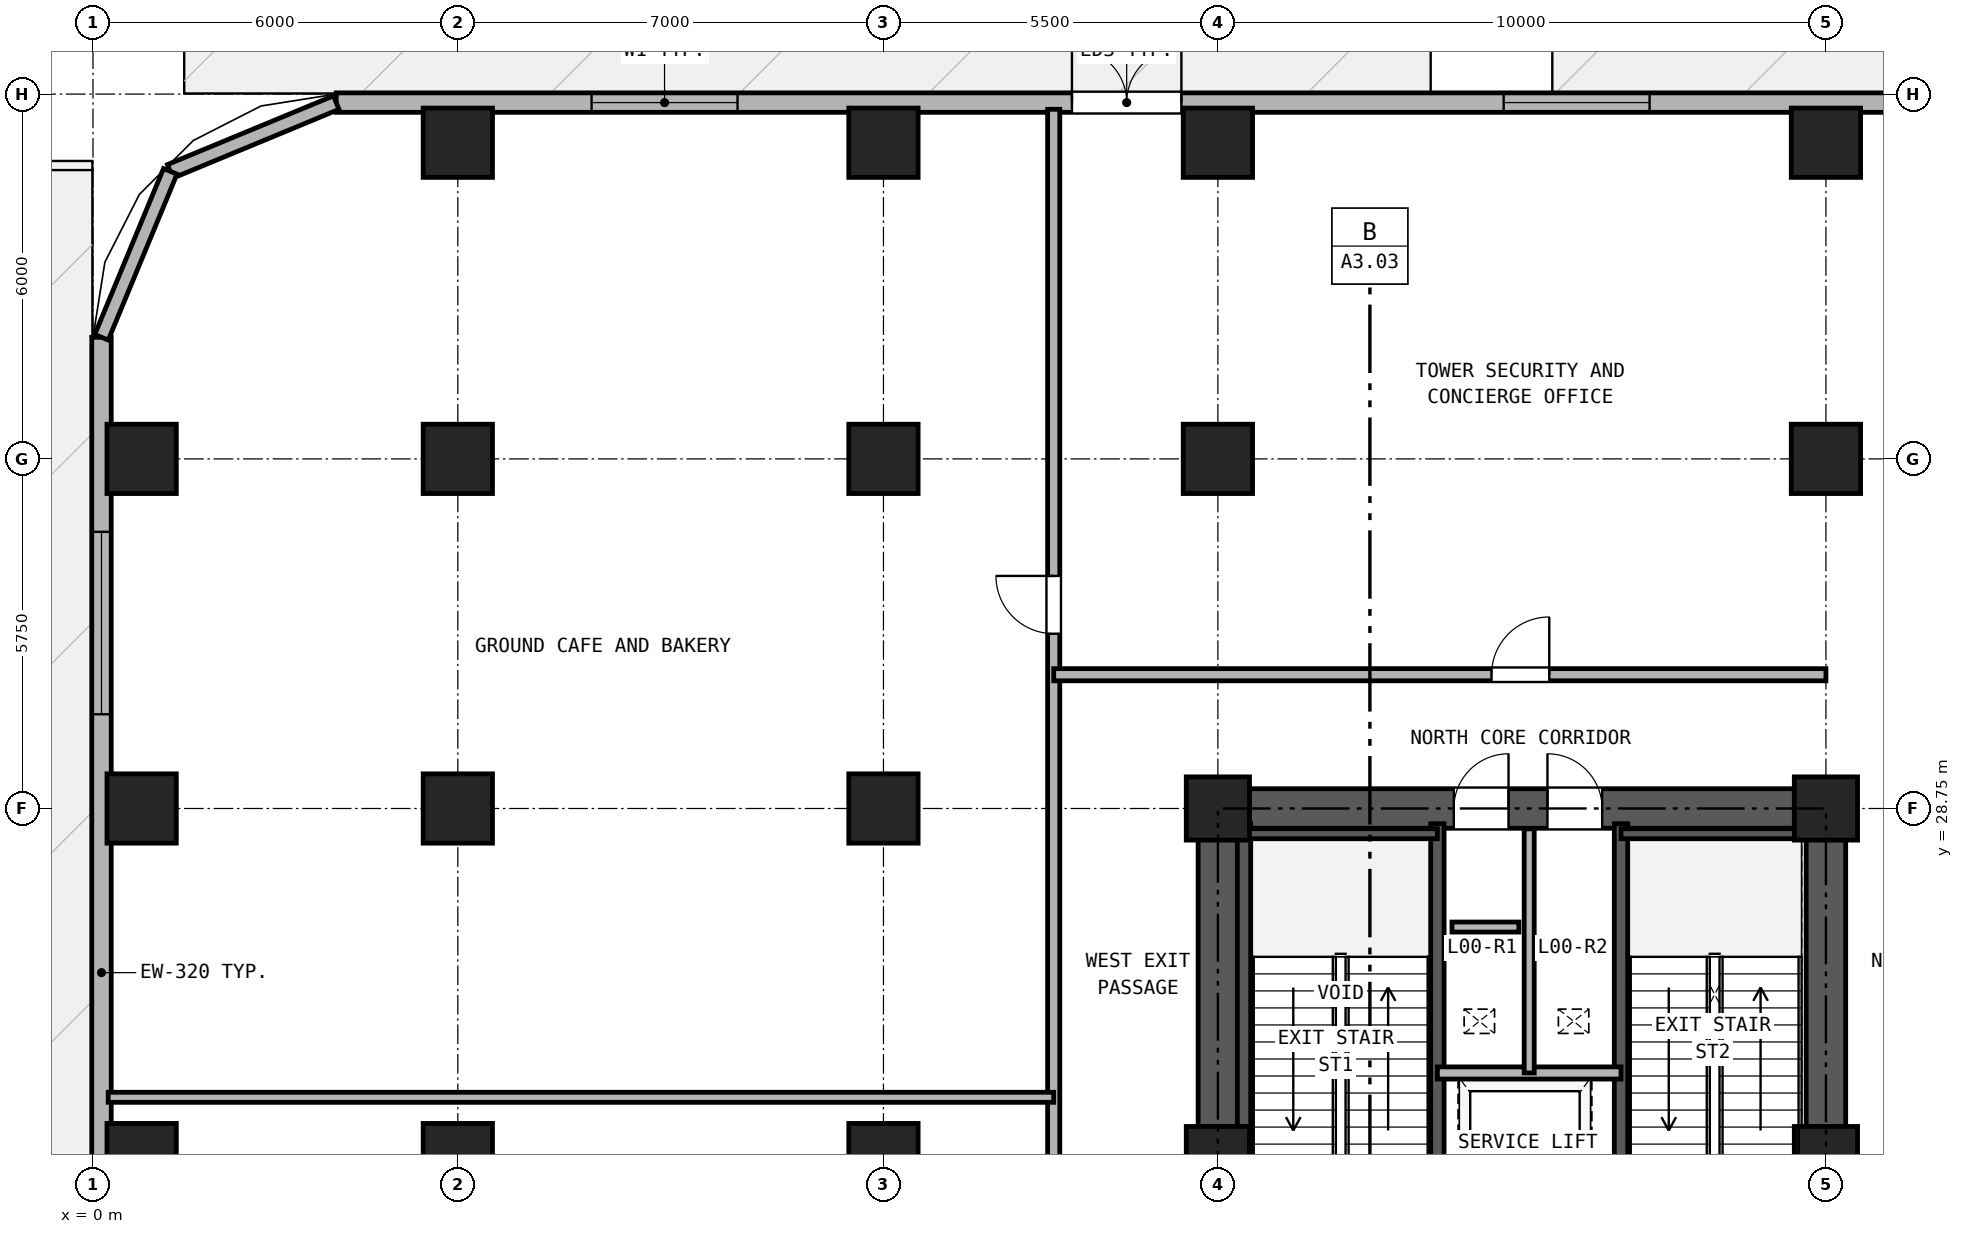
"""IFC4 building model, lengths in metres.
Left out: names, types, materials, properties, quantities, classifications, styles, units other than length and angle.
Written with IfcOpenShell. Run it as: python <this file> out.ifc"""

import sys

from ifc_helpers import new_model, si_unit, direction, frame, frame_2d, origin, origin_2d, place, context, subcontext, project, spatial, rectangle, hollow_rectangle, extrude, source, transform, mapped, element, fill, save


model = new_model("IFC4")
c1 = context("Model", 3, precision=1e-05, world=origin(), true_north=direction((0.0, 1.0)))
c2 = subcontext(c1, "Body", "Model", "MODEL_VIEW")
j1 = project(units=[si_unit("LENGTHUNIT", "METRE"), si_unit("PLANEANGLEUNIT", "RADIAN")], contexts=[c1])
p1 = place(None, origin())
s1 = spatial("IfcSite", under=j1, at=p1, CompositionType="ELEMENT")
p2 = place(p1, origin())
s2 = spatial("IfcBuilding", under=s1, at=p2, CompositionType="ELEMENT")
p3 = place(p2, origin())
s3 = spatial("IfcBuildingStorey", under=s2, at=p3, CompositionType="ELEMENT", Elevation=0.0)
m1 = source(origin(), c2, "Body", "SweptSolid", [
    extrude(hollow_rectangle(XDim=1.14, YDim=1.14, WallThickness=0.07, at=origin_2d()), origin(), (0.0, 0.0, 1.0), 4.18),
])
for number, where, z_axis, x_axis in (
    (1, (6.0, 39.7, 0.0), (0.0, 0.0, 1.0), (1.0, 0.0, 0.0)),
    (2, (13.0, 39.7, 0.0), (0.0, 0.0, 1.0), (1.0, 0.0, 0.0)),
    (3, (18.5, 39.7, 0.0), (0.0, 0.0, 1.0), (1.0, 0.0, 0.0)),
    (4, (28.5, 39.7, 0.0), (0.0, 0.0, 1.0), (1.0, 0.0, 0.0)),
    (5, (0.8, 23.0, 0.0), (0.0, 0.0, 1.0), (1.0, 0.0, 0.0)),
    (6, (0.8, 28.75, 0.0), (0.0, 0.0, 1.0), (1.0, 0.0, 0.0)),
    (7, (0.8, 34.5, 0.0), (0.0, 0.0, 1.0), (1.0, 0.0, 0.0)),
    (8, (6.0, 23.0, 0.0), (0.0, 0.0, 1.0), (1.0, 0.0, 0.0)),
    (9, (6.0, 28.75, 0.0), (0.0, 0.0, 1.0), (1.0, 0.0, 0.0)),
    (10, (6.0, 34.5, 0.0), (0.0, 0.0, 1.0), (1.0, 0.0, 0.0)),
    (11, (13.0, 23.0, 0.0), (0.0, 0.0, 1.0), (1.0, 0.0, 0.0)),
    (12, (13.0, 28.75, 0.0), (0.0, 0.0, 1.0), (1.0, 0.0, 0.0)),
    (13, (13.0, 34.5, 0.0), (0.0, 0.0, 1.0), (1.0, 0.0, 0.0)),
):
    element("IfcColumn", number, at=place(p3, frame(where, z_axis=z_axis, x_axis=x_axis)), inside=s3, PredefinedType="COLUMN", context=c2, shape_type="MappedRepresentation", body=[
        mapped(m1, transform((0.0, 0.0, 0.0), x_axis=(1.0, 0.0, 0.0), y_axis=(0.0, 1.0, 0.0), z_axis=(0.0, 0.0, 1.0), scale=1.0)),
    ])
m2 = source(origin(), c2, "Body", "SweptSolid", [
    extrude(hollow_rectangle(XDim=1.04, YDim=1.04, WallThickness=0.065, at=origin_2d()), origin(), (0.0, 0.0, 1.0), 4.18),
])
for number, where, z_axis, x_axis in (
    (14, (18.5, 23.0, 0.0), (0.0, 0.0, 1.0), (1.0, 0.0, 0.0)),
    (15, (18.5, 28.75, 0.0), (0.0, 0.0, 1.0), (1.0, 0.0, 0.0)),
):
    element("IfcColumn", number, at=place(p3, frame(where, z_axis=z_axis, x_axis=x_axis)), inside=s3, PredefinedType="COLUMN", context=c2, shape_type="MappedRepresentation", body=[
        mapped(m2, transform((0.0, 0.0, 0.0), x_axis=(1.0, 0.0, 0.0), y_axis=(0.0, 1.0, 0.0), z_axis=(0.0, 0.0, 1.0), scale=1.0)),
    ])
p4 = place(p3, frame((18.5, 34.5, 0.0), z_axis=(0.0, 0.0, 1.0), x_axis=(1.0, 0.0, 0.0)))
e16 = element("IfcColumn", 16, at=p4, inside=s3, PredefinedType="COLUMN", context=c2, shape_type="MappedRepresentation", body=[
    mapped(m1, transform((0.0, 0.0, 0.0), x_axis=(1.0, 0.0, 0.0), y_axis=(0.0, 1.0, 0.0), z_axis=(0.0, 0.0, 1.0), scale=1.0)),
])
for number, where, z_axis, x_axis in (
    (17, (28.5, 23.0, 0.0), (0.0, 0.0, 1.0), (1.0, 0.0, 0.0)),
    (18, (28.5, 28.75, 0.0), (0.0, 0.0, 1.0), (1.0, 0.0, 0.0)),
):
    element("IfcColumn", number, at=place(p3, frame(where, z_axis=z_axis, x_axis=x_axis)), inside=s3, PredefinedType="COLUMN", context=c2, shape_type="MappedRepresentation", body=[
        mapped(m2, transform((0.0, 0.0, 0.0), x_axis=(1.0, 0.0, 0.0), y_axis=(0.0, 1.0, 0.0), z_axis=(0.0, 0.0, 1.0), scale=1.0)),
    ])
p5 = place(p3, frame((28.5, 34.5, 0.0), z_axis=(0.0, 0.0, 1.0), x_axis=(1.0, 0.0, 0.0)))
e19 = element("IfcColumn", 19, at=p5, inside=s3, PredefinedType="COLUMN", context=c2, shape_type="MappedRepresentation", body=[
    mapped(m1, transform((0.0, 0.0, 0.0), x_axis=(1.0, 0.0, 0.0), y_axis=(0.0, 1.0, 0.0), z_axis=(0.0, 0.0, 1.0), scale=1.0)),
])
p6 = place(p3, frame((0.14, 4.0, 0.0), z_axis=(0.0, 0.0, 1.0), x_axis=(0.0, 1.0, 0.0)))
e20 = element("IfcWall", 20, at=p6, inside=s3, PredefinedType="SOLIDWALL", context=c2, shape_type="SweptSolid", body=[
    extrude(rectangle(XDim=32.5, YDim=0.32, at=frame_2d((16.25, 0.0))), origin(), (0.0, 0.0, 1.0), 4.18),
])
p7 = place(p6, frame((9.8, 0.0, 0.0)))
e21 = element("IfcOpeningElement", 21, at=p7, cuts=e20, PredefinedType="OPENING", context=c2, shape_type="SweptSolid", body=[
    extrude(rectangle(XDim=2.2, YDim=2.5, at=frame_2d((1.1, 1.25))), frame((0.0, 0.17, 0.0), z_axis=(0.0, -1.0, 0.0), x_axis=(1.0, 0.0, 0.0)), (0.0, 0.0, 1.0), 0.34),
])
p8 = place(p6, frame((3.4, 0.0, 0.9)))
e22 = element("IfcOpeningElement", 22, at=p8, cuts=e20, PredefinedType="OPENING", context=c2, shape_type="SweptSolid", body=[
    extrude(rectangle(XDim=3.0, YDim=2.25, at=frame_2d((1.5, 1.125))), frame((0.0, 0.17, 0.0), z_axis=(0.0, -1.0, 0.0), x_axis=(1.0, 0.0, 0.0)), (0.0, 0.0, 1.0), 0.34),
])
p9 = place(p6, frame((14.8, 0.0, 0.9)))
e23 = element("IfcOpeningElement", 23, at=p9, cuts=e20, PredefinedType="OPENING", context=c2, shape_type="SweptSolid", body=[
    extrude(rectangle(XDim=3.0, YDim=2.25, at=frame_2d((1.5, 1.125))), frame((0.0, 0.17, 0.0), z_axis=(0.0, -1.0, 0.0), x_axis=(1.0, 0.0, 0.0)), (0.0, 0.0, 1.0), 0.34),
])
p10 = place(p6, frame((26.3, 0.0, 0.9)))
e24 = element("IfcOpeningElement", 24, at=p10, cuts=e20, PredefinedType="OPENING", context=c2, shape_type="SweptSolid", body=[
    extrude(rectangle(XDim=3.0, YDim=2.25, at=frame_2d((1.5, 1.125))), frame((0.0, 0.17, 0.0), z_axis=(0.0, -1.0, 0.0), x_axis=(1.0, 0.0, 0.0)), (0.0, 0.0, 1.0), 0.34),
])
p11 = place(p3, frame((4.0, 40.36, 0.0), z_axis=(0.0, 0.0, 1.0), x_axis=(1.0, 0.0, 0.0)))
e25 = element("IfcWall", 25, at=p11, inside=s3, PredefinedType="SOLIDWALL", context=c2, shape_type="SweptSolid", body=[
    extrude(rectangle(XDim=39.0, YDim=0.32, at=frame_2d((19.5, 0.0))), origin(), (0.0, 0.0, 1.0), 4.18),
])
p12 = place(p11, frame((12.1, 0.0, 0.0)))
e26 = element("IfcOpeningElement", 26, at=p12, cuts=e25, PredefinedType="OPENING", context=c2, shape_type="SweptSolid", body=[
    extrude(rectangle(XDim=1.8, YDim=2.35, at=frame_2d((0.9, 1.175))), frame((0.0, 0.17, 0.0), z_axis=(0.0, -1.0, 0.0), x_axis=(1.0, 0.0, 0.0)), (0.0, 0.0, 1.0), 0.34),
])
p13 = place(p11, frame((25.95, 0.0, 0.0)))
e27 = element("IfcOpeningElement", 27, at=p13, cuts=e25, PredefinedType="OPENING", context=c2, shape_type="SweptSolid", body=[
    extrude(rectangle(XDim=1.8, YDim=2.35, at=frame_2d((0.9, 1.175))), frame((0.0, 0.17, 0.0), z_axis=(0.0, -1.0, 0.0), x_axis=(1.0, 0.0, 0.0)), (0.0, 0.0, 1.0), 0.34),
])
p14 = place(p11, frame((4.2, 0.0, 0.9)))
e28 = element("IfcOpeningElement", 28, at=p14, cuts=e25, PredefinedType="OPENING", context=c2, shape_type="SweptSolid", body=[
    extrude(rectangle(XDim=2.4, YDim=2.1, at=frame_2d((1.2, 1.05))), frame((0.0, 0.17, 0.0), z_axis=(0.0, -1.0, 0.0), x_axis=(1.0, 0.0, 0.0)), (0.0, 0.0, 1.0), 0.34),
])
p15 = place(p11, frame((19.2, 0.0, 0.9)))
e29 = element("IfcOpeningElement", 29, at=p15, cuts=e25, PredefinedType="OPENING", context=c2, shape_type="SweptSolid", body=[
    extrude(rectangle(XDim=2.4, YDim=2.1, at=frame_2d((1.2, 1.05))), frame((0.0, 0.17, 0.0), z_axis=(0.0, -1.0, 0.0), x_axis=(1.0, 0.0, 0.0)), (0.0, 0.0, 1.0), 0.34),
])
p16 = place(p11, frame((31.8, 0.0, 0.9)))
e30 = element("IfcOpeningElement", 30, at=p16, cuts=e25, PredefinedType="OPENING", context=c2, shape_type="SweptSolid", body=[
    extrude(rectangle(XDim=2.4, YDim=2.1, at=frame_2d((1.2, 1.05))), frame((0.0, 0.17, 0.0), z_axis=(0.0, -1.0, 0.0), x_axis=(1.0, 0.0, 0.0)), (0.0, 0.0, 1.0), 0.34),
])
for number, where, z_axis, x_axis in (
    (31, (4.0, 40.36, 0.0), (0.0, 0.0, 1.0), (-0.924, -0.383, 0.0)),
    (32, (1.271, 39.229, 0.0), (0.0, 0.0, 1.0), (-0.383, -0.924, 0.0)),
):
    element("IfcWall", number, at=place(p3, frame(where, z_axis=z_axis, x_axis=x_axis)), inside=s3, PredefinedType="SOLIDWALL", context=c2, shape_type="SweptSolid", body=[
        extrude(rectangle(XDim=2.954, YDim=0.24, at=frame_2d((1.477, 0.0))), origin(), (0.0, 0.0, 1.0), 4.18),
    ])
p17 = place(p3, frame((18.175, 28.75, 0.0), z_axis=(0.0, 0.0, 1.0), x_axis=(1.0, 0.0, 0.0)))
e33 = element("IfcWall", 33, at=p17, inside=s3, PredefinedType="SHEAR", context=c2, shape_type="SweptSolid", body=[
    extrude(rectangle(XDim=10.65, YDim=0.65, at=frame_2d((5.325, 0.0))), origin(), (0.0, 0.0, 1.0), 4.18),
])
p18 = place(p17, frame((4.205, 0.0, 0.0)))
e34 = element("IfcOpeningElement", 34, at=p18, cuts=e33, PredefinedType="OPENING", context=c2, shape_type="SweptSolid", body=[
    extrude(rectangle(XDim=0.9, YDim=2.05, at=frame_2d((0.45, 1.025))), frame((0.0, 0.335, 0.0), z_axis=(0.0, -1.0, 0.0), x_axis=(1.0, 0.0, 0.0)), (0.0, 0.0, 1.0), 0.67),
])
p19 = place(p17, frame((5.745, 0.0, 0.0)))
e35 = element("IfcOpeningElement", 35, at=p19, cuts=e33, PredefinedType="OPENING", context=c2, shape_type="SweptSolid", body=[
    extrude(rectangle(XDim=0.9, YDim=2.05, at=frame_2d((0.45, 1.025))), frame((0.0, 0.335, 0.0), z_axis=(0.0, -1.0, 0.0), x_axis=(1.0, 0.0, 0.0)), (0.0, 0.0, 1.0), 0.67),
])
p20 = place(p3, frame((18.5, 11.825, 0.0), z_axis=(0.0, 0.0, 1.0), x_axis=(0.0, 1.0, 0.0)))
e36 = element("IfcWall", 36, at=p20, inside=s3, PredefinedType="SHEAR", context=c2, shape_type="SweptSolid", body=[
    extrude(rectangle(XDim=16.6, YDim=0.65, at=frame_2d((8.3, 0.0))), origin(), (0.0, 0.0, 1.0), 4.18),
])
p21 = place(p20, frame((7.325, 0.0, 0.0)))
e37 = element("IfcOpeningElement", 37, at=p21, cuts=e36, PredefinedType="OPENING", context=c2, shape_type="SweptSolid", body=[
    extrude(rectangle(XDim=1.15, YDim=2.2, at=frame_2d((0.575, 1.1))), frame((0.0, 0.335, 0.0), z_axis=(0.0, -1.0, 0.0), x_axis=(1.0, 0.0, 0.0)), (0.0, 0.0, 1.0), 0.67),
])
p22 = place(p3, frame((28.5, 11.825, 0.0), z_axis=(0.0, 0.0, 1.0), x_axis=(0.0, 1.0, 0.0)))
e38 = element("IfcWall", 38, at=p22, inside=s3, PredefinedType="SHEAR", context=c2, shape_type="SweptSolid", body=[
    extrude(rectangle(XDim=16.6, YDim=0.65, at=frame_2d((8.3, 0.0))), origin(), (0.0, 0.0, 1.0), 4.18),
])
p23 = place(p22, frame((7.325, 0.0, 0.0)))
e39 = element("IfcOpeningElement", 39, at=p23, cuts=e38, PredefinedType="OPENING", context=c2, shape_type="SweptSolid", body=[
    extrude(rectangle(XDim=1.15, YDim=2.2, at=frame_2d((0.575, 1.1))), frame((0.0, 0.335, 0.0), z_axis=(0.0, -1.0, 0.0), x_axis=(1.0, 0.0, 0.0)), (0.0, 0.0, 1.0), 0.67),
])
for number, where, z_axis, x_axis in (
    (40, (18.93, 21.39, 0.0), (0.0, 0.0, 1.0), (0.0, 1.0, 0.0)),
    (41, (22.11, 21.39, 0.0), (0.0, 0.0, 1.0), (0.0, 1.0, 0.0)),
    (42, (25.13, 21.39, 0.0), (0.0, 0.0, 1.0), (0.0, 1.0, 0.0)),
):
    element("IfcWall", number, at=place(p3, frame(where, z_axis=z_axis, x_axis=x_axis)), inside=s3, PredefinedType="SOLIDWALL", context=c2, shape_type="SweptSolid", body=[
        extrude(rectangle(XDim=7.11, YDim=0.22, at=frame_2d((3.555, 0.0))), origin(), (0.0, 0.0, 1.0), 4.18),
    ])
p24 = place(p3, frame((18.835, 28.335, 0.0), z_axis=(0.0, 0.0, 1.0), x_axis=(1.0, 0.0, 0.0)))
e43 = element("IfcWall", 43, at=p24, inside=s3, PredefinedType="PARTITIONING", context=c2, shape_type="SweptSolid", body=[
    extrude(rectangle(XDim=3.275, YDim=0.165, at=frame_2d((1.638, 0.0))), origin(), (0.0, 0.0, 1.0), 4.18),
])
p25 = place(p3, frame((25.13, 28.335, 0.0), z_axis=(0.0, 0.0, 1.0), x_axis=(1.0, 0.0, 0.0)))
e44 = element("IfcWall", 44, at=p25, inside=s3, PredefinedType="PARTITIONING", context=c2, shape_type="SweptSolid", body=[
    extrude(rectangle(XDim=3.035, YDim=0.165, at=frame_2d((1.518, 0.0))), origin(), (0.0, 0.0, 1.0), 4.18),
])
p26 = place(p3, frame((22.11, 24.4, 0.0), z_axis=(0.0, 0.0, 1.0), x_axis=(1.0, 0.0, 0.0)))
e45 = element("IfcWall", 45, at=p26, inside=s3, PredefinedType="PARTITIONING", context=c2, shape_type="SweptSolid", body=[
    extrude(rectangle(XDim=3.02, YDim=0.2, at=frame_2d((1.51, 0.0))), origin(), (0.0, 0.0, 1.0), 4.18),
])
p27 = place(p3, frame((23.62, 24.4, 0.0), z_axis=(0.0, 0.0, 1.0), x_axis=(0.0, 1.0, 0.0)))
e46 = element("IfcWall", 46, at=p27, inside=s3, PredefinedType="PARTITIONING", context=c2, shape_type="SweptSolid", body=[
    extrude(rectangle(XDim=4.015, YDim=0.165, at=frame_2d((2.008, 0.0))), origin(), (0.0, 0.0, 1.0), 4.18),
])
p28 = place(p3, frame((15.8, 11.0, 0.0), z_axis=(0.0, 0.0, 1.0), x_axis=(0.0, 1.0, 0.0)))
e47 = element("IfcWall", 47, at=p28, inside=s3, PredefinedType="PARTITIONING", context=c2, shape_type="SweptSolid", body=[
    extrude(rectangle(XDim=29.25, YDim=0.2, at=frame_2d((14.625, 0.0))), origin(), (0.0, 0.0, 1.0), 4.18),
])
p29 = place(p28, frame((6.0, 0.0, 0.0)))
e48 = element("IfcOpeningElement", 48, at=p29, cuts=e47, PredefinedType="OPENING", context=c2, shape_type="SweptSolid", body=[
    extrude(rectangle(XDim=0.95, YDim=2.15, at=frame_2d((0.475, 1.075))), frame((0.0, 0.11, 0.0), z_axis=(0.0, -1.0, 0.0), x_axis=(1.0, 0.0, 0.0)), (0.0, 0.0, 1.0), 0.22),
])
p30 = place(p28, frame((20.625, 0.0, 0.0)))
e49 = element("IfcOpeningElement", 49, at=p30, cuts=e47, PredefinedType="OPENING", context=c2, shape_type="SweptSolid", body=[
    extrude(rectangle(XDim=0.95, YDim=2.15, at=frame_2d((0.475, 1.075))), frame((0.0, 0.11, 0.0), z_axis=(0.0, -1.0, 0.0), x_axis=(1.0, 0.0, 0.0)), (0.0, 0.0, 1.0), 0.22),
])
p31 = place(p3, frame((15.8, 30.95, 0.0), z_axis=(0.0, 0.0, 1.0), x_axis=(1.0, 0.0, 0.0)))
e50 = element("IfcWall", 50, at=p31, inside=s3, PredefinedType="PARTITIONING", context=c2, shape_type="SweptSolid", body=[
    extrude(rectangle(XDim=12.7, YDim=0.2, at=frame_2d((6.35, 0.0))), origin(), (0.0, 0.0, 1.0), 4.18),
])
p32 = place(p31, frame((7.2, 0.0, 0.0)))
e51 = element("IfcOpeningElement", 51, at=p32, cuts=e50, PredefinedType="OPENING", context=c2, shape_type="SweptSolid", body=[
    extrude(rectangle(XDim=0.95, YDim=2.15, at=frame_2d((0.475, 1.075))), frame((0.0, 0.11, 0.0), z_axis=(0.0, -1.0, 0.0), x_axis=(1.0, 0.0, 0.0)), (0.0, 0.0, 1.0), 0.22),
])
p33 = place(p3, frame((0.25, 24.0, 0.0), z_axis=(0.0, 0.0, 1.0), x_axis=(1.0, 0.0, 0.0)))
e52 = element("IfcWall", 52, at=p33, inside=s3, PredefinedType="PARTITIONING", context=c2, shape_type="SweptSolid", body=[
    extrude(rectangle(XDim=15.55, YDim=0.165, at=frame_2d((7.775, 0.0))), origin(), (0.0, 0.0, 1.0), 4.18),
])
p34 = place(p3, frame((22.35, 26.8, 0.0), z_axis=(0.0, 0.0, 1.0), x_axis=(1.0, 0.0, 0.0)))
e53 = element("IfcWall", 53, at=p34, inside=s3, PredefinedType="PARTITIONING", context=c2, shape_type="SweptSolid", body=[
    extrude(rectangle(XDim=1.1, YDim=0.165, at=frame_2d((0.55, 0.0))), origin(), (0.0, 0.0, 1.0), 4.18),
])
p35 = place(p12, origin())
e54 = element("IfcDoor", 54, at=p35, inside=s3, OperationType="DOUBLE_DOOR_SINGLE_SWING", PredefinedType="DOOR", context=c2, shape_type="SweptSolid", body=[
    extrude(rectangle(XDim=1.8, YDim=2.35, at=frame_2d((0.9, 1.175))), frame((0.0, 0.025, 0.0), z_axis=(0.0, -1.0, 0.0), x_axis=(1.0, 0.0, 0.0)), (0.0, 0.0, 1.0), 0.05),
])
fill(e26, e54)
p36 = place(p10, origin())
e55 = element("IfcWindow", 55, at=p36, inside=s3, PartitioningType="SINGLE_PANEL", PredefinedType="WINDOW", context=c2, shape_type="SweptSolid", body=[
    extrude(rectangle(XDim=3.0, YDim=2.25, at=frame_2d((1.5, 1.125))), frame((0.0, 0.03, 0.0), z_axis=(0.0, -1.0, 0.0), x_axis=(1.0, 0.0, 0.0)), (0.0, 0.0, 1.0), 0.06),
])
fill(e24, e55)
p37 = place(p14, origin())
e56 = element("IfcWindow", 56, at=p37, inside=s3, PartitioningType="SINGLE_PANEL", PredefinedType="WINDOW", context=c2, shape_type="SweptSolid", body=[
    extrude(rectangle(XDim=2.4, YDim=2.1, at=frame_2d((1.2, 1.05))), frame((0.0, 0.03, 0.0), z_axis=(0.0, -1.0, 0.0), x_axis=(1.0, 0.0, 0.0)), (0.0, 0.0, 1.0), 0.06),
])
fill(e28, e56)
p38 = place(p15, origin())
e57 = element("IfcWindow", 57, at=p38, inside=s3, PartitioningType="SINGLE_PANEL", PredefinedType="WINDOW", context=c2, shape_type="SweptSolid", body=[
    extrude(rectangle(XDim=2.4, YDim=2.1, at=frame_2d((1.2, 1.05))), frame((0.0, 0.03, 0.0), z_axis=(0.0, -1.0, 0.0), x_axis=(1.0, 0.0, 0.0)), (0.0, 0.0, 1.0), 0.06),
])
fill(e29, e57)
p39 = place(p18, origin())
e58 = element("IfcDoor", 58, at=p39, inside=s3, OperationType="SINGLE_SWING_RIGHT", PredefinedType="DOOR", context=c2, shape_type="SweptSolid", body=[
    extrude(rectangle(XDim=0.9, YDim=2.05, at=frame_2d((0.45, 1.025))), frame((0.0, 0.025, 0.0), z_axis=(0.0, -1.0, 0.0), x_axis=(1.0, 0.0, 0.0)), (0.0, 0.0, 1.0), 0.05),
])
fill(e34, e58)
p40 = place(p19, origin())
e59 = element("IfcDoor", 59, at=p40, inside=s3, OperationType="SINGLE_SWING_LEFT", PredefinedType="DOOR", context=c2, shape_type="SweptSolid", body=[
    extrude(rectangle(XDim=0.9, YDim=2.05, at=frame_2d((0.45, 1.025))), frame((0.0, 0.025, 0.0), z_axis=(0.0, -1.0, 0.0), x_axis=(1.0, 0.0, 0.0)), (0.0, 0.0, 1.0), 0.05),
])
fill(e35, e59)
p41 = place(p30, frame((0.95, 0.0, 0.0), z_axis=(0.0, 0.0, 1.0), x_axis=(-1.0, 0.0, 0.0)))
e60 = element("IfcDoor", 60, at=p41, inside=s3, OperationType="SINGLE_SWING_RIGHT", PredefinedType="DOOR", context=c2, shape_type="SweptSolid", body=[
    extrude(rectangle(XDim=0.95, YDim=2.15, at=frame_2d((0.475, 1.075))), frame((0.0, 0.025, 0.0), z_axis=(0.0, -1.0, 0.0), x_axis=(1.0, 0.0, 0.0)), (0.0, 0.0, 1.0), 0.05),
])
fill(e49, e60)
p42 = place(p32, origin())
e61 = element("IfcDoor", 61, at=p42, inside=s3, OperationType="SINGLE_SWING_RIGHT", PredefinedType="DOOR", context=c2, shape_type="SweptSolid", body=[
    extrude(rectangle(XDim=0.95, YDim=2.15, at=frame_2d((0.475, 1.075))), frame((0.0, 0.025, 0.0), z_axis=(0.0, -1.0, 0.0), x_axis=(1.0, 0.0, 0.0)), (0.0, 0.0, 1.0), 0.05),
])
fill(e51, e61)
save(model, sys.argv[1])
